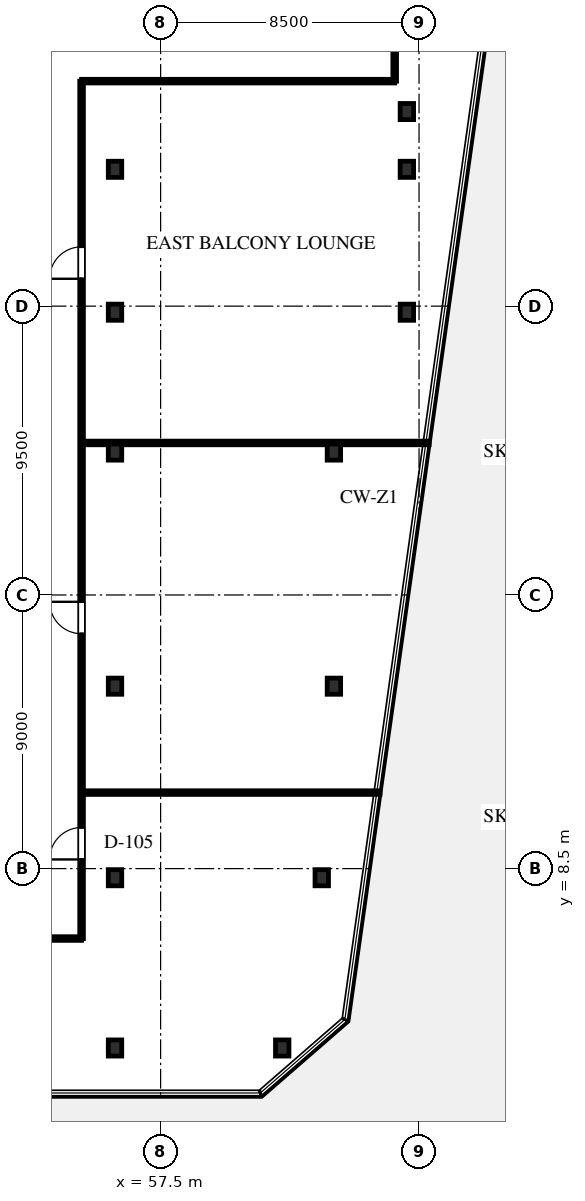
"""IFC4 building model, lengths in metres.
Left out: names, types, materials, properties, quantities, classifications, styles, units other than length and angle.
Written with IfcOpenShell. Run it as: python <this file> out.ifc"""

import sys

from ifc_helpers import new_model, si_unit, direction, frame, frame_2d, origin, origin_2d, place, context, subcontext, project, spatial, rectangle, i_section, extrude, element, fill, save


model = new_model("IFC4")
c1 = context("Model", 3, precision=1e-05, world=origin(), true_north=direction((0.0, 1.0)))
c2 = subcontext(c1, "Body", "Model", "MODEL_VIEW")
j1 = project(units=[si_unit("LENGTHUNIT", "METRE"), si_unit("PLANEANGLEUNIT", "RADIAN")], contexts=[c1])
p1 = place(None, origin())
s1 = spatial("IfcSite", under=j1, at=p1, CompositionType="ELEMENT")
p2 = place(p1, origin())
s2 = spatial("IfcBuilding", under=s1, at=p2, CompositionType="ELEMENT")
p3 = place(p2, frame((0.0, 0.0, 29.5)))
s3 = spatial("IfcBuildingStorey", under=s2, at=p3, CompositionType="ELEMENT", Elevation=29.5)
for number, where, z_axis, x_axis in (
    (1, (56.0, 14.5, 0.0), (0.0, 0.0, 1.0), (1.0, 0.0, 0.0)),
    (2, (63.2, 14.5, 0.0), (0.0, 0.0, 1.0), (1.0, 0.0, 0.0)),
    (3, (56.0, 22.2, 0.0), (0.0, 0.0, 1.0), (1.0, 0.0, 0.0)),
    (4, (63.2, 22.2, 0.0), (0.0, 0.0, 1.0), (1.0, 0.0, 0.0)),
    (5, (56.0, 26.8, 0.0), (0.0, 0.0, 1.0), (1.0, 0.0, 0.0)),
    (6, (65.6, 26.8, 0.0), (0.0, 0.0, 1.0), (1.0, 0.0, 0.0)),
    (7, (56.0, 31.5, 0.0), (0.0, 0.0, 1.0), (1.0, 0.0, 0.0)),
    (8, (65.6, 31.5, 0.0), (0.0, 0.0, 1.0), (1.0, 0.0, 0.0)),
    (9, (56.0, 2.6, 0.0), (0.0, 0.0, 1.0), (1.0, 0.0, 0.0)),
    (10, (61.5, 2.6, 0.0), (0.0, 0.0, 1.0), (1.0, 0.0, 0.0)),
    (11, (56.0, 8.2, 0.0), (0.0, 0.0, 1.0), (1.0, 0.0, 0.0)),
    (12, (62.8, 8.2, 0.0), (0.0, 0.0, 1.0), (1.0, 0.0, 0.0)),
    (13, (65.6, 33.4, 0.0), (0.0, 0.0, 1.0), (1.0, 0.0, 0.0)),
):
    element("IfcColumn", number, at=place(p3, frame(where, z_axis=z_axis, x_axis=x_axis)), inside=s3, PredefinedType="COLUMN", context=c2, shape_type="SweptSolid", body=[
        extrude(i_section(OverallWidth=0.442, OverallDepth=0.531, WebThickness=0.066, FlangeThickness=0.106, FilletRadius=0.03, at=origin_2d()), origin(), (0.0, 0.0, 1.0), 4.0),
    ])
p4 = place(p3, frame((54.9, 34.4, 0.0), z_axis=(0.0, 0.0, 1.0), x_axis=(1.0, 0.0, 0.0)))
e14 = element("IfcWall", 14, at=p4, inside=s3, PredefinedType="PARTITIONING", context=c2, shape_type="SweptSolid", body=[
    extrude(rectangle(XDim=10.3, YDim=0.12, at=frame_2d((5.15, 0.0))), origin(), (0.0, 0.0, 1.0), 2.813),
])
p5 = place(p3, frame((65.2, 34.4, 0.0), z_axis=(0.0, 0.0, 1.0), x_axis=(0.0, 1.0, 0.0)))
e15 = element("IfcWall", 15, at=p5, inside=s3, PredefinedType="PARTITIONING", context=c2, shape_type="SweptSolid", body=[
    extrude(rectangle(XDim=3.217, YDim=0.12, at=frame_2d((1.608, 0.0))), origin(), (0.0, 0.0, 1.0), 2.813),
])
p6 = place(p3, frame((54.9, 6.2, 0.0), z_axis=(0.0, 0.0, 1.0), x_axis=(0.0, 1.0, 0.0)))
e16 = element("IfcWall", 16, at=p6, inside=s3, PredefinedType="PARTITIONING", context=c2, shape_type="SweptSolid", body=[
    extrude(rectangle(XDim=28.2, YDim=0.12, at=frame_2d((14.1, 0.0))), origin(), (0.0, 0.0, 1.0), 2.813),
])
p7 = place(p6, frame((2.601, 0.0, 0.0)))
e17 = element("IfcOpeningElement", 17, at=p7, cuts=e16, PredefinedType="OPENING", context=c2, shape_type="SweptSolid", body=[
    extrude(rectangle(XDim=1.05, YDim=2.2, at=frame_2d((0.525, 1.1))), frame((0.0, 0.07, 0.0), z_axis=(0.0, -1.0, 0.0), x_axis=(1.0, 0.0, 0.0)), (0.0, 0.0, 1.0), 0.14),
])
p8 = place(p6, frame((10.025, 0.0, 0.0)))
e18 = element("IfcOpeningElement", 18, at=p8, cuts=e16, PredefinedType="OPENING", context=c2, shape_type="SweptSolid", body=[
    extrude(rectangle(XDim=1.05, YDim=2.2, at=frame_2d((0.525, 1.1))), frame((0.0, 0.07, 0.0), z_axis=(0.0, -1.0, 0.0), x_axis=(1.0, 0.0, 0.0)), (0.0, 0.0, 1.0), 0.14),
])
p9 = place(p6, frame((21.7, 0.0, 0.0)))
e19 = element("IfcOpeningElement", 19, at=p9, cuts=e16, PredefinedType="OPENING", context=c2, shape_type="SweptSolid", body=[
    extrude(rectangle(XDim=1.05, YDim=2.2, at=frame_2d((0.525, 1.1))), frame((0.0, 0.07, 0.0), z_axis=(0.0, -1.0, 0.0), x_axis=(1.0, 0.0, 0.0)), (0.0, 0.0, 1.0), 0.14),
])
p10 = place(p3, frame((52.9, 6.2, 0.0), z_axis=(0.0, 0.0, 1.0), x_axis=(1.0, 0.0, 0.0)))
e20 = element("IfcWall", 20, at=p10, inside=s3, PredefinedType="PARTITIONING", context=c2, shape_type="SweptSolid", body=[
    extrude(rectangle(XDim=2.0, YDim=0.12, at=frame_2d((1.0, 0.0))), origin(), (0.0, 0.0, 1.0), 2.978),
])
p11 = place(p3, frame((54.968, 11.0, 0.0), z_axis=(0.0, 0.0, 1.0), x_axis=(1.0, 0.0, 0.0)))
e21 = element("IfcWall", 21, at=p11, inside=s3, PredefinedType="PARTITIONING", context=c2, shape_type="SweptSolid", body=[
    extrude(rectangle(XDim=9.747, YDim=0.12, at=frame_2d((4.873, 0.0))), origin(), (0.0, 0.0, 1.0), 2.813),
])
p12 = place(p3, frame((54.968, 22.5, 0.0), z_axis=(0.0, 0.0, 1.0), x_axis=(1.0, 0.0, 0.0)))
e22 = element("IfcWall", 22, at=p12, inside=s3, PredefinedType="PARTITIONING", context=c2, shape_type="SweptSolid", body=[
    extrude(rectangle(XDim=11.363, YDim=0.12, at=frame_2d((5.681, 0.0))), origin(), (0.0, 0.0, 1.0), 2.813),
])
p13 = place(p7, origin())
e23 = element("IfcDoor", 23, at=p13, inside=s3, OperationType="SINGLE_SWING_LEFT", PredefinedType="DOOR", context=c2, shape_type="SweptSolid", body=[
    extrude(rectangle(XDim=1.05, YDim=2.2, at=frame_2d((0.525, 1.1))), frame((0.0, 0.025, 0.0), z_axis=(0.0, -1.0, 0.0), x_axis=(1.0, 0.0, 0.0)), (0.0, 0.0, 1.0), 0.05),
])
fill(e17, e23)
p14 = place(p8, origin())
e24 = element("IfcDoor", 24, at=p14, inside=s3, OperationType="SINGLE_SWING_RIGHT", PredefinedType="DOOR", context=c2, shape_type="SweptSolid", body=[
    extrude(rectangle(XDim=1.05, YDim=2.2, at=frame_2d((0.525, 1.1))), frame((0.0, 0.025, 0.0), z_axis=(0.0, -1.0, 0.0), x_axis=(1.0, 0.0, 0.0)), (0.0, 0.0, 1.0), 0.05),
])
fill(e18, e24)
p15 = place(p9, origin())
e25 = element("IfcDoor", 25, at=p15, inside=s3, OperationType="SINGLE_SWING_LEFT", PredefinedType="DOOR", context=c2, shape_type="SweptSolid", body=[
    extrude(rectangle(XDim=1.05, YDim=2.2, at=frame_2d((0.525, 1.1))), frame((0.0, 0.025, 0.0), z_axis=(0.0, -1.0, 0.0), x_axis=(1.0, 0.0, 0.0)), (0.0, 0.0, 1.0), 0.05),
])
fill(e19, e25)
save(model, sys.argv[1])
